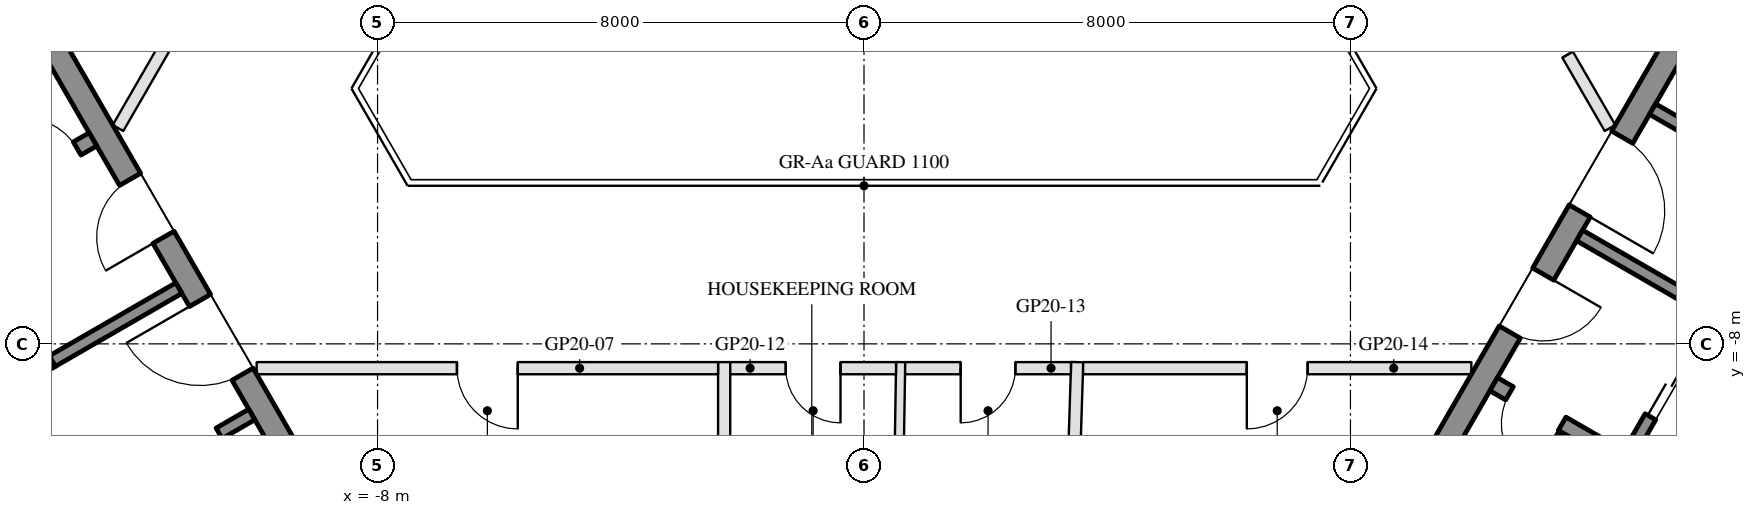
"""IFC4 building model, lengths in metres.
Left out: names, types, materials, properties, quantities, classifications, styles, units other than length and angle.
Written with IfcOpenShell. Run it as: python <this file> out.ifc"""

import sys

from ifc_helpers import new_model, si_unit, direction, frame, frame_2d, origin, place, context, subcontext, project, spatial, rectangle, extrude, element, fill, save


model = new_model("IFC4")
c1 = context("Model", 3, precision=1e-05, world=origin(), true_north=direction((0.0, 1.0)))
c2 = subcontext(c1, "Body", "Model", "MODEL_VIEW")
j1 = project(units=[si_unit("LENGTHUNIT", "METRE"), si_unit("PLANEANGLEUNIT", "RADIAN")], contexts=[c1])
p1 = place(None, origin())
s1 = spatial("IfcSite", under=j1, at=p1, CompositionType="ELEMENT")
p2 = place(p1, origin())
s2 = spatial("IfcBuilding", under=s1, at=p2, CompositionType="ELEMENT")
p3 = place(p2, frame((0.0, 0.0, 213.2)))
s3 = spatial("IfcBuildingStorey", under=s2, at=p3, CompositionType="ELEMENT", Elevation=213.2)
p4 = place(p3, frame((-13.845, -2.22, 0.0), z_axis=(0.0, 0.0, 1.0), x_axis=(0.500004234368, -0.866022959057, 0.0)))
e1 = element("IfcWall", 1, at=p4, inside=s3, PredefinedType="SHEAR", context=c2, shape_type="SweptSolid", body=[
    extrude(rectangle(XDim=10.0, YDim=0.4, at=frame_2d((5.0, 0.0))), origin(), (0.0, 0.0, 1.0), 3.5),
])
p5 = place(p4, frame((3.55, 0.0, 0.0)))
e2 = element("IfcOpeningElement", 2, at=p5, cuts=e1, PredefinedType="OPENING", context=c2, shape_type="SweptSolid", body=[
    extrude(rectangle(XDim=1.1, YDim=2.1, at=frame_2d((0.55, 1.05))), frame((0.0, 0.21, 0.0), z_axis=(0.0, -1.0, 0.0), x_axis=(1.0, 0.0, 0.0)), (0.0, 0.0, 1.0), 0.42),
])
p6 = place(p4, frame((5.85, 0.0, 0.0)))
e3 = element("IfcOpeningElement", 3, at=p6, cuts=e1, PredefinedType="OPENING", context=c2, shape_type="SweptSolid", body=[
    extrude(rectangle(XDim=1.4, YDim=2.1, at=frame_2d((0.7, 1.05))), frame((0.0, 0.21, 0.0), z_axis=(0.0, -1.0, 0.0), x_axis=(1.0, 0.0, 0.0)), (0.0, 0.0, 1.0), 0.42),
])
p7 = place(p3, frame((-12.681, -4.636, 0.0), z_axis=(0.0, 0.0, 1.0), x_axis=(-0.866021702275, -0.500006411147, 0.0)))
e4 = element("IfcWall", 4, at=p7, inside=s3, PredefinedType="SHEAR", context=c2, shape_type="SweptSolid", body=[
    extrude(rectangle(XDim=6.45, YDim=0.25, at=frame_2d((3.225, 0.0))), origin(), (0.0, 0.0, 1.0), 3.5),
])
p8 = place(p7, frame((0.3, 0.0, 0.0)))
e5 = element("IfcOpeningElement", 5, at=p8, cuts=e4, PredefinedType="OPENING", context=c2, shape_type="SweptSolid", body=[
    extrude(rectangle(XDim=1.0, YDim=2.1, at=frame_2d((0.5, 1.05))), frame((0.0, 0.135, 0.0), z_axis=(0.0, -1.0, 0.0), x_axis=(1.0, 0.0, 0.0)), (0.0, 0.0, 1.0), 0.27),
])
p9 = place(p3, frame((-14.783, -5.995, 0.0), z_axis=(0.0, 0.0, 1.0), x_axis=(0.49994636267, -0.866056369097, 0.0)))
e6 = element("IfcWall", 6, at=p9, inside=s3, PredefinedType="SHEAR", context=c2, shape_type="SweptSolid", body=[
    extrude(rectangle(XDim=2.8, YDim=0.2, at=frame_2d((1.4, 0.0))), origin(), (0.0, 0.0, 1.0), 3.5),
])
p10 = place(p9, frame((0.7, 0.0, 0.0)))
e7 = element("IfcOpeningElement", 7, at=p10, cuts=e6, PredefinedType="OPENING", context=c2, shape_type="SweptSolid", body=[
    extrude(rectangle(XDim=1.2, YDim=2.1, at=frame_2d((0.6, 1.05))), frame((0.0, 0.11, 0.0), z_axis=(0.0, -1.0, 0.0), x_axis=(1.0, 0.0, 0.0)), (0.0, 0.0, 1.0), 0.22),
])
p11 = place(p3, frame((-11.268, -7.083, 0.0), z_axis=(0.0, 0.0, 1.0), x_axis=(-0.866050077142, -0.499957262057, 0.0)))
e8 = element("IfcWall", 8, at=p11, inside=s3, PredefinedType="SHEAR", context=c2, shape_type="SweptSolid", body=[
    extrude(rectangle(XDim=2.4, YDim=0.2, at=frame_2d((1.2, 0.0))), origin(), (0.0, 0.0, 1.0), 3.5),
])
p12 = place(p3, frame((-10.068, -9.162, 0.0), z_axis=(0.0, 0.0, 1.0), x_axis=(-0.866032725843, -0.499987317609, 0.0)))
e9 = element("IfcWall", 9, at=p12, inside=s3, PredefinedType="SHEAR", context=c2, shape_type="SweptSolid", body=[
    extrude(rectangle(XDim=10.16, YDim=0.2, at=frame_2d((5.08, 0.0))), origin(), (0.0, 0.0, 1.0), 3.5),
])
p13 = place(p12, frame((0.62, 0.0, 0.0)))
e10 = element("IfcOpeningElement", 10, at=p13, cuts=e9, PredefinedType="OPENING", context=c2, shape_type="SweptSolid", body=[
    extrude(rectangle(XDim=1.1, YDim=2.1, at=frame_2d((0.55, 1.05))), frame((0.0, 0.11, 0.0), z_axis=(0.0, -1.0, 0.0), x_axis=(1.0, 0.0, 0.0)), (0.0, 0.0, 1.0), 0.22),
])
p14 = place(p12, frame((3.16, 0.0, 0.0)))
e11 = element("IfcOpeningElement", 11, at=p14, cuts=e9, PredefinedType="OPENING", context=c2, shape_type="SweptSolid", body=[
    extrude(rectangle(XDim=1.1, YDim=2.1, at=frame_2d((0.55, 1.05))), frame((0.0, 0.11, 0.0), z_axis=(0.0, -1.0, 0.0), x_axis=(1.0, 0.0, 0.0)), (0.0, 0.0, 1.0), 0.22),
])
p15 = place(p12, frame((5.7, 0.0, 0.0)))
e12 = element("IfcOpeningElement", 12, at=p15, cuts=e9, PredefinedType="OPENING", context=c2, shape_type="SweptSolid", body=[
    extrude(rectangle(XDim=1.1, YDim=2.1, at=frame_2d((0.55, 1.05))), frame((0.0, 0.11, 0.0), z_axis=(0.0, -1.0, 0.0), x_axis=(1.0, 0.0, 0.0)), (0.0, 0.0, 1.0), 0.22),
])
p16 = place(p12, frame((8.24, 0.0, 0.0)))
e13 = element("IfcOpeningElement", 13, at=p16, cuts=e9, PredefinedType="OPENING", context=c2, shape_type="SweptSolid", body=[
    extrude(rectangle(XDim=1.1, YDim=2.1, at=frame_2d((0.55, 1.05))), frame((0.0, 0.11, 0.0), z_axis=(0.0, -1.0, 0.0), x_axis=(1.0, 0.0, 0.0)), (0.0, 0.0, 1.0), 0.22),
])
p17 = place(p3, frame((8.845, -10.88, 0.0), z_axis=(0.0, 0.0, 1.0), x_axis=(0.500004234368, 0.866022959057, 0.0)))
e14 = element("IfcWall", 14, at=p17, inside=s3, PredefinedType="SHEAR", context=c2, shape_type="SweptSolid", body=[
    extrude(rectangle(XDim=10.0, YDim=0.4, at=frame_2d((5.0, 0.0))), origin(), (0.0, 0.0, 1.0), 3.5),
])
p18 = place(p17, frame((3.55, 0.0, 0.0)))
e15 = element("IfcOpeningElement", 15, at=p18, cuts=e14, PredefinedType="OPENING", context=c2, shape_type="SweptSolid", body=[
    extrude(rectangle(XDim=1.1, YDim=2.1, at=frame_2d((0.55, 1.05))), frame((0.0, 0.21, 0.0), z_axis=(0.0, -1.0, 0.0), x_axis=(1.0, 0.0, 0.0)), (0.0, 0.0, 1.0), 0.42),
])
p19 = place(p17, frame((5.85, 0.0, 0.0)))
e16 = element("IfcOpeningElement", 16, at=p19, cuts=e14, PredefinedType="OPENING", context=c2, shape_type="SweptSolid", body=[
    extrude(rectangle(XDim=1.4, YDim=2.1, at=frame_2d((0.7, 1.05))), frame((0.0, 0.21, 0.0), z_axis=(0.0, -1.0, 0.0), x_axis=(1.0, 0.0, 0.0)), (0.0, 0.0, 1.0), 0.42),
])
p20 = place(p3, frame((10.356, -8.664, 0.0), z_axis=(0.0, 0.0, 1.0), x_axis=(0.866028629588, -0.499994412703, 0.0)))
e17 = element("IfcWall", 17, at=p20, inside=s3, PredefinedType="SHEAR", context=c2, shape_type="SweptSolid", body=[
    extrude(rectangle(XDim=6.45, YDim=0.25, at=frame_2d((3.225, 0.0))), origin(), (0.0, 0.0, 1.0), 3.5),
])
p21 = place(p20, frame((0.3, 0.0, 0.0)))
e18 = element("IfcOpeningElement", 18, at=p21, cuts=e17, PredefinedType="OPENING", context=c2, shape_type="SweptSolid", body=[
    extrude(rectangle(XDim=1.0, YDim=2.1, at=frame_2d((0.5, 1.05))), frame((0.0, 0.135, 0.0), z_axis=(0.0, -1.0, 0.0), x_axis=(1.0, 0.0, 0.0)), (0.0, 0.0, 1.0), 0.27),
])
p22 = place(p3, frame((12.583, -9.805, 0.0), z_axis=(0.0, 0.0, 1.0), x_axis=(0.49994636267, 0.866056369097, 0.0)))
e19 = element("IfcWall", 19, at=p22, inside=s3, PredefinedType="SHEAR", context=c2, shape_type="SweptSolid", body=[
    extrude(rectangle(XDim=2.8, YDim=0.2, at=frame_2d((1.4, 0.0))), origin(), (0.0, 0.0, 1.0), 3.5),
])
p23 = place(p22, frame((0.7, 0.0, 0.0)))
e20 = element("IfcOpeningElement", 20, at=p23, cuts=e19, PredefinedType="OPENING", context=c2, shape_type="SweptSolid", body=[
    extrude(rectangle(XDim=1.2, YDim=2.1, at=frame_2d((0.6, 1.05))), frame((0.0, 0.11, 0.0), z_axis=(0.0, -1.0, 0.0), x_axis=(1.0, 0.0, 0.0)), (0.0, 0.0, 1.0), 0.22),
])
p24 = place(p3, frame((11.768, -6.217, 0.0), z_axis=(0.0, 0.0, 1.0), x_axis=(0.866050077142, -0.499957262057, 0.0)))
e21 = element("IfcWall", 21, at=p24, inside=s3, PredefinedType="SHEAR", context=c2, shape_type="SweptSolid", body=[
    extrude(rectangle(XDim=2.4, YDim=0.2, at=frame_2d((1.2, 0.0))), origin(), (0.0, 0.0, 1.0), 3.5),
])
p25 = place(p3, frame((12.968, -4.138, 0.0), z_axis=(0.0, 0.0, 1.0), x_axis=(0.866028328073, -0.49999493495, 0.0)))
e22 = element("IfcWall", 22, at=p25, inside=s3, PredefinedType="SHEAR", context=c2, shape_type="SweptSolid", body=[
    extrude(rectangle(XDim=10.16, YDim=0.2, at=frame_2d((5.08, 0.0))), origin(), (0.0, 0.0, 1.0), 3.5),
])
p26 = place(p25, frame((4.53, 0.0, 0.0)))
e23 = element("IfcOpeningElement", 23, at=p26, cuts=e22, PredefinedType="OPENING", context=c2, shape_type="SweptSolid", body=[
    extrude(rectangle(XDim=0.9, YDim=2.1, at=frame_2d((0.45, 1.05))), frame((0.0, 0.11, 0.0), z_axis=(0.0, -1.0, 0.0), x_axis=(1.0, 0.0, 0.0)), (0.0, 0.0, 1.0), 0.22),
])
p27 = place(p3, frame((-2.3, -18.38, 0.0), z_axis=(0.0, 0.0, 1.0), x_axis=(0.0, 1.0, 0.0)))
e24 = element("IfcWall", 24, at=p27, inside=s3, PredefinedType="PARTITIONING", context=c2, shape_type="SweptSolid", body=[
    extrude(rectangle(XDim=10.08, YDim=0.2, at=frame_2d((5.04, 0.0))), origin(), (0.0, 0.0, 1.0), 3.06),
])
p28 = place(p3, frame((3.15, -19.28, 0.0), z_axis=(0.0, 0.0, 1.0), x_axis=(0.032468308586, 0.999472765481, 0.0)))
e25 = element("IfcWall", 25, at=p28, inside=s3, PredefinedType="PARTITIONING", context=c2, shape_type="SweptSolid", body=[
    extrude(rectangle(XDim=10.986, YDim=0.2, at=frame_2d((5.493, 0.0))), origin(), (0.0, 0.0, 1.0), 3.06),
])
p29 = place(p3, frame((-2.4, -8.4, 0.0), z_axis=(0.0, 0.0, 1.0), x_axis=(-1.0, 0.0, 0.0)))
e26 = element("IfcWall", 26, at=p29, inside=s3, PredefinedType="PARTITIONING", context=c2, shape_type="SweptSolid", body=[
    extrude(rectangle(XDim=7.588, YDim=0.2, at=frame_2d((3.794, 0.0))), origin(), (0.0, 0.0, 1.0), 2.95),
])
p30 = place(p29, frame((3.294, 0.0, 0.0)))
e27 = element("IfcOpeningElement", 27, at=p30, cuts=e26, PredefinedType="OPENING", context=c2, shape_type="SweptSolid", body=[
    extrude(rectangle(XDim=1.0, YDim=2.1, at=frame_2d((0.5, 1.05))), frame((0.0, 0.11, 0.0), z_axis=(0.0, -1.0, 0.0), x_axis=(1.0, 0.0, 0.0)), (0.0, 0.0, 1.0), 0.22),
])
p31 = place(p3, frame((0.425, -19.28, 0.0), z_axis=(0.0, 0.0, 1.0), x_axis=(0.016229462675, 0.999868293597, 0.0)))
e28 = element("IfcWall", 28, at=p31, inside=s3, PredefinedType="PARTITIONING", context=c2, shape_type="SweptSolid", body=[
    extrude(rectangle(XDim=10.981, YDim=0.15, at=frame_2d((5.491, 0.0))), origin(), (0.0, 0.0, 1.0), 3.06),
])
p32 = place(p3, frame((0.527, -8.4, 0.0), z_axis=(0.0, 0.0, 1.0), x_axis=(-1.0, 0.0, 0.0)))
e29 = element("IfcWall", 29, at=p32, inside=s3, PredefinedType="PARTITIONING", context=c2, shape_type="SweptSolid", body=[
    extrude(rectangle(XDim=2.727, YDim=0.2, at=frame_2d((1.363, 0.0))), origin(), (0.0, 0.0, 1.0), 2.95),
])
p33 = place(p32, frame((0.913, 0.0, 0.0)))
e30 = element("IfcOpeningElement", 30, at=p33, cuts=e29, PredefinedType="OPENING", context=c2, shape_type="SweptSolid", body=[
    extrude(rectangle(XDim=0.9, YDim=2.1, at=frame_2d((0.45, 1.05))), frame((0.0, 0.11, 0.0), z_axis=(0.0, -1.0, 0.0), x_axis=(1.0, 0.0, 0.0)), (0.0, 0.0, 1.0), 0.22),
])
p34 = place(p3, frame((3.403, -8.4, 0.0), z_axis=(0.0, 0.0, 1.0), x_axis=(-1.0, 0.0, 0.0)))
e31 = element("IfcWall", 31, at=p34, inside=s3, PredefinedType="PARTITIONING", context=c2, shape_type="SweptSolid", body=[
    extrude(rectangle(XDim=2.727, YDim=0.2, at=frame_2d((1.363, 0.0))), origin(), (0.0, 0.0, 1.0), 3.55),
])
p35 = place(p34, frame((0.913, 0.0, 0.0)))
e32 = element("IfcOpeningElement", 32, at=p35, cuts=e31, PredefinedType="OPENING", context=c2, shape_type="SweptSolid", body=[
    extrude(rectangle(XDim=0.9, YDim=2.1, at=frame_2d((0.45, 1.05))), frame((0.0, 0.11, 0.0), z_axis=(0.0, -1.0, 0.0), x_axis=(1.0, 0.0, 0.0)), (0.0, 0.0, 1.0), 0.22),
])
p36 = place(p3, frame((9.988, -8.4, 0.0), z_axis=(0.0, 0.0, 1.0), x_axis=(-1.0, 0.0, 0.0)))
e33 = element("IfcWall", 33, at=p36, inside=s3, PredefinedType="PARTITIONING", context=c2, shape_type="SweptSolid", body=[
    extrude(rectangle(XDim=6.385, YDim=0.2, at=frame_2d((3.192, 0.0))), origin(), (0.0, 0.0, 1.0), 2.95),
])
p37 = place(p36, frame((2.692, 0.0, 0.0)))
e34 = element("IfcOpeningElement", 34, at=p37, cuts=e33, PredefinedType="OPENING", context=c2, shape_type="SweptSolid", body=[
    extrude(rectangle(XDim=1.0, YDim=2.1, at=frame_2d((0.5, 1.05))), frame((0.0, 0.11, 0.0), z_axis=(0.0, -1.0, 0.0), x_axis=(1.0, 0.0, 0.0)), (0.0, 0.0, 1.0), 0.22),
])
p38 = place(p3, frame((10.375, -1.169, 0.0), z_axis=(0.0, 0.0, 1.0), x_axis=(0.500055316652, -0.865993464345, 0.0)))
e35 = element("IfcWall", 35, at=p38, inside=s3, PredefinedType="PARTITIONING", context=c2, shape_type="SweptSolid", body=[
    extrude(rectangle(XDim=3.788, YDim=0.2, at=frame_2d((1.894, 0.0))), origin(), (0.0, 0.0, 1.0), 2.95),
])
p39 = place(p38, frame((1.394, 0.0, 0.0)))
e36 = element("IfcOpeningElement", 36, at=p39, cuts=e35, PredefinedType="OPENING", context=c2, shape_type="SweptSolid", body=[
    extrude(rectangle(XDim=1.0, YDim=2.1, at=frame_2d((0.5, 1.05))), frame((0.0, 0.11, 0.0), z_axis=(0.0, -1.0, 0.0), x_axis=(1.0, 0.0, 0.0)), (0.0, 0.0, 1.0), 0.22),
])
p40 = place(p3, frame((-12.269, -4.45, 0.0), z_axis=(0.0, 0.0, 1.0), x_axis=(0.500014573982, 0.866016989329, 0.0)))
e37 = element("IfcWall", 37, at=p40, inside=s3, PredefinedType="PARTITIONING", context=c2, shape_type="SweptSolid", body=[
    extrude(rectangle(XDim=5.088, YDim=0.2, at=frame_2d((2.544, 0.0))), origin(), (0.0, 0.0, 1.0), 2.95),
])
p41 = place(p40, frame((2.044, 0.0, 0.0)))
e38 = element("IfcOpeningElement", 38, at=p41, cuts=e37, PredefinedType="OPENING", context=c2, shape_type="SweptSolid", body=[
    extrude(rectangle(XDim=1.0, YDim=2.1, at=frame_2d((0.5, 1.05))), frame((0.0, 0.11, 0.0), z_axis=(0.0, -1.0, 0.0), x_axis=(1.0, 0.0, 0.0)), (0.0, 0.0, 1.0), 0.22),
])
p42 = place(p13, origin())
e39 = element("IfcDoor", 39, at=p42, inside=s3, OperationType="DOUBLE_DOOR_SLIDING", PredefinedType="DOOR", context=c2, shape_type="SweptSolid", body=[
    extrude(rectangle(XDim=1.1, YDim=2.1, at=frame_2d((0.55, 1.05))), frame((0.0, 0.025, 0.0), z_axis=(0.0, -1.0, 0.0), x_axis=(1.0, 0.0, 0.0)), (0.0, 0.0, 1.0), 0.05),
])
fill(e10, e39)
p43 = place(p5, frame((1.1, 0.0, 0.0), z_axis=(0.0, 0.0, 1.0), x_axis=(-1.0, 0.0, 0.0)))
e40 = element("IfcDoor", 40, at=p43, inside=s3, OperationType="SINGLE_SWING_LEFT", PredefinedType="DOOR", context=c2, shape_type="SweptSolid", body=[
    extrude(rectangle(XDim=1.1, YDim=2.1, at=frame_2d((0.55, 1.05))), frame((0.0, 0.025, 0.0), z_axis=(0.0, -1.0, 0.0), x_axis=(1.0, 0.0, 0.0)), (0.0, 0.0, 1.0), 0.05),
])
fill(e2, e40)
p44 = place(p6, frame((1.4, 0.0, 0.0), z_axis=(0.0, 0.0, 1.0), x_axis=(-1.0, 0.0, 0.0)))
e41 = element("IfcDoor", 41, at=p44, inside=s3, OperationType="DOUBLE_DOOR_SINGLE_SWING", PredefinedType="DOOR", context=c2, shape_type="SweptSolid", body=[
    extrude(rectangle(XDim=1.4, YDim=2.1, at=frame_2d((0.7, 1.05))), frame((0.0, 0.025, 0.0), z_axis=(0.0, -1.0, 0.0), x_axis=(1.0, 0.0, 0.0)), (0.0, 0.0, 1.0), 0.05),
])
fill(e3, e41)
p45 = place(p8, frame((1.0, 0.0, 0.0), z_axis=(0.0, 0.0, 1.0), x_axis=(-1.0, 0.0, 0.0)))
e42 = element("IfcDoor", 42, at=p45, inside=s3, OperationType="SINGLE_SWING_LEFT", PredefinedType="DOOR", context=c2, shape_type="SweptSolid", body=[
    extrude(rectangle(XDim=1.0, YDim=2.1, at=frame_2d((0.5, 1.05))), frame((0.0, 0.025, 0.0), z_axis=(0.0, -1.0, 0.0), x_axis=(1.0, 0.0, 0.0)), (0.0, 0.0, 1.0), 0.05),
])
fill(e5, e42)
p46 = place(p23, origin())
e43 = element("IfcDoor", 43, at=p46, inside=s3, OperationType="DOUBLE_DOOR_SLIDING", PredefinedType="DOOR", context=c2, shape_type="SweptSolid", body=[
    extrude(rectangle(XDim=1.2, YDim=2.1, at=frame_2d((0.6, 1.05))), frame((0.0, 0.025, 0.0), z_axis=(0.0, -1.0, 0.0), x_axis=(1.0, 0.0, 0.0)), (0.0, 0.0, 1.0), 0.05),
])
fill(e20, e43)
p47 = place(p18, frame((1.1, 0.0, 0.0), z_axis=(0.0, 0.0, 1.0), x_axis=(-1.0, 0.0, 0.0)))
e44 = element("IfcDoor", 44, at=p47, inside=s3, OperationType="SINGLE_SWING_LEFT", PredefinedType="DOOR", context=c2, shape_type="SweptSolid", body=[
    extrude(rectangle(XDim=1.1, YDim=2.1, at=frame_2d((0.55, 1.05))), frame((0.0, 0.025, 0.0), z_axis=(0.0, -1.0, 0.0), x_axis=(1.0, 0.0, 0.0)), (0.0, 0.0, 1.0), 0.05),
])
fill(e15, e44)
p48 = place(p19, frame((1.4, 0.0, 0.0), z_axis=(0.0, 0.0, 1.0), x_axis=(-1.0, 0.0, 0.0)))
e45 = element("IfcDoor", 45, at=p48, inside=s3, OperationType="DOUBLE_DOOR_SINGLE_SWING", PredefinedType="DOOR", context=c2, shape_type="SweptSolid", body=[
    extrude(rectangle(XDim=1.4, YDim=2.1, at=frame_2d((0.7, 1.05))), frame((0.0, 0.025, 0.0), z_axis=(0.0, -1.0, 0.0), x_axis=(1.0, 0.0, 0.0)), (0.0, 0.0, 1.0), 0.05),
])
fill(e16, e45)
p49 = place(p21, frame((1.0, 0.0, 0.0), z_axis=(0.0, 0.0, 1.0), x_axis=(-1.0, 0.0, 0.0)))
e46 = element("IfcDoor", 46, at=p49, inside=s3, OperationType="SINGLE_SWING_LEFT", PredefinedType="DOOR", context=c2, shape_type="SweptSolid", body=[
    extrude(rectangle(XDim=1.0, YDim=2.1, at=frame_2d((0.5, 1.05))), frame((0.0, 0.025, 0.0), z_axis=(0.0, -1.0, 0.0), x_axis=(1.0, 0.0, 0.0)), (0.0, 0.0, 1.0), 0.05),
])
fill(e18, e46)
p50 = place(p30, origin())
e47 = element("IfcDoor", 47, at=p50, inside=s3, OperationType="SINGLE_SWING_LEFT", PredefinedType="DOOR", context=c2, shape_type="SweptSolid", body=[
    extrude(rectangle(XDim=1.0, YDim=2.1, at=frame_2d((0.5, 1.05))), frame((0.0, 0.025, 0.0), z_axis=(0.0, -1.0, 0.0), x_axis=(1.0, 0.0, 0.0)), (0.0, 0.0, 1.0), 0.05),
])
fill(e27, e47)
p51 = place(p33, origin())
e48 = element("IfcDoor", 48, at=p51, inside=s3, OperationType="SINGLE_SWING_LEFT", PredefinedType="DOOR", context=c2, shape_type="SweptSolid", body=[
    extrude(rectangle(XDim=0.9, YDim=2.1, at=frame_2d((0.45, 1.05))), frame((0.0, 0.025, 0.0), z_axis=(0.0, -1.0, 0.0), x_axis=(1.0, 0.0, 0.0)), (0.0, 0.0, 1.0), 0.05),
])
fill(e30, e48)
p52 = place(p35, origin())
e49 = element("IfcDoor", 49, at=p52, inside=s3, OperationType="SINGLE_SWING_RIGHT", PredefinedType="DOOR", context=c2, shape_type="SweptSolid", body=[
    extrude(rectangle(XDim=0.9, YDim=2.1, at=frame_2d((0.45, 1.05))), frame((0.0, 0.025, 0.0), z_axis=(0.0, -1.0, 0.0), x_axis=(1.0, 0.0, 0.0)), (0.0, 0.0, 1.0), 0.05),
])
fill(e32, e49)
p53 = place(p37, origin())
e50 = element("IfcDoor", 50, at=p53, inside=s3, OperationType="SINGLE_SWING_RIGHT", PredefinedType="DOOR", context=c2, shape_type="SweptSolid", body=[
    extrude(rectangle(XDim=1.0, YDim=2.1, at=frame_2d((0.5, 1.05))), frame((0.0, 0.025, 0.0), z_axis=(0.0, -1.0, 0.0), x_axis=(1.0, 0.0, 0.0)), (0.0, 0.0, 1.0), 0.05),
])
fill(e34, e50)
p54 = place(p39, origin())
e51 = element("IfcDoor", 51, at=p54, inside=s3, OperationType="SINGLE_SWING_LEFT", PredefinedType="DOOR", context=c2, shape_type="SweptSolid", body=[
    extrude(rectangle(XDim=1.0, YDim=2.1, at=frame_2d((0.5, 1.05))), frame((0.0, 0.025, 0.0), z_axis=(0.0, -1.0, 0.0), x_axis=(1.0, 0.0, 0.0)), (0.0, 0.0, 1.0), 0.05),
])
fill(e36, e51)
save(model, sys.argv[1])
